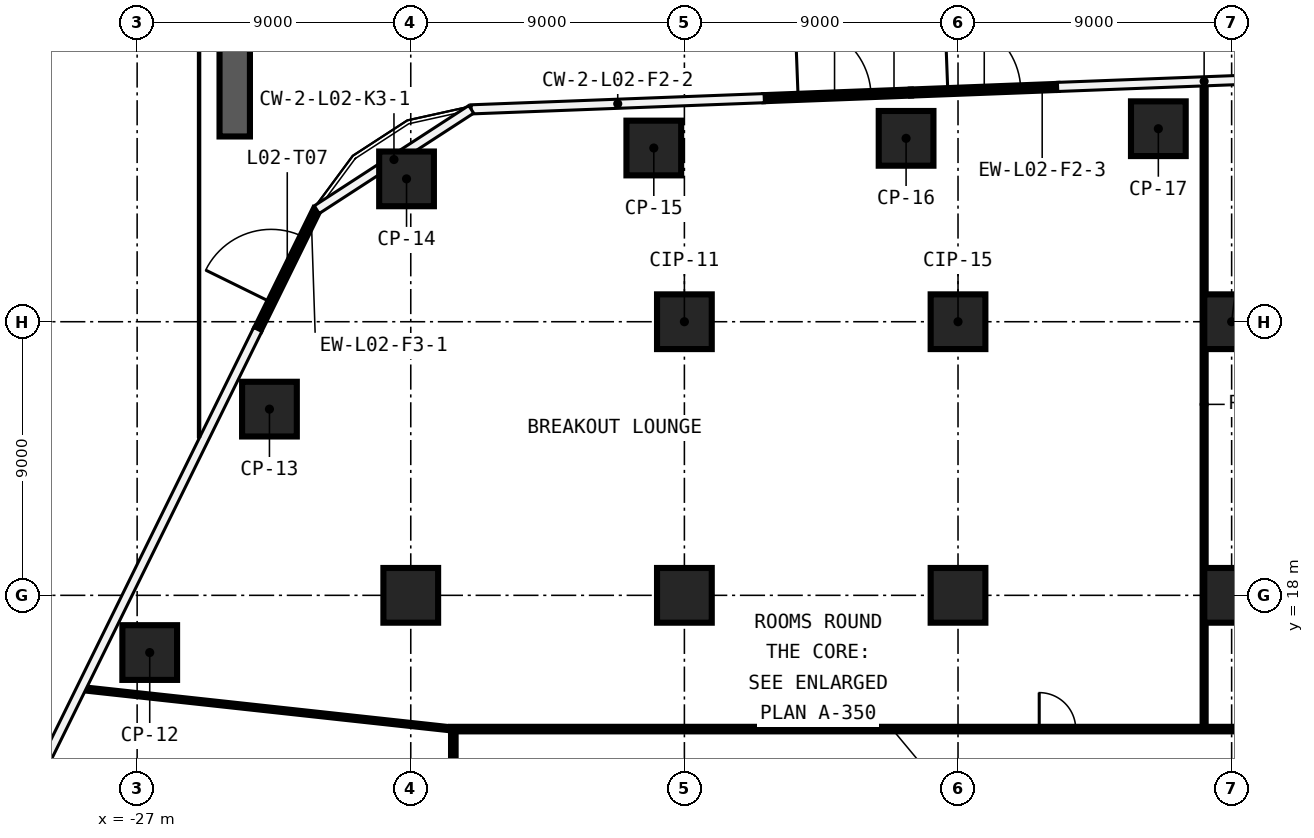
"""IFC4 building model, lengths in metres.
Left out: names, types, materials, properties, quantities, classifications, styles, units other than length and angle.
Written with IfcOpenShell. Run it as: python <this file> out.ifc"""

import sys

from ifc_helpers import new_model, si_unit, direction, frame, frame_2d, origin, origin_2d, place, context, subcontext, project, spatial, rectangle, extrude, element, fill, save


model = new_model("IFC4")
c1 = context("Model", 3, precision=1e-05, world=origin(), true_north=direction((0.0, 1.0)))
c2 = subcontext(c1, "Body", "Model", "MODEL_VIEW")
j1 = project(units=[si_unit("LENGTHUNIT", "METRE"), si_unit("PLANEANGLEUNIT", "RADIAN")], contexts=[c1])
p1 = place(None, origin())
s1 = spatial("IfcSite", under=j1, at=p1, CompositionType="ELEMENT")
p2 = place(p1, origin())
s2 = spatial("IfcBuilding", under=s1, at=p2, CompositionType="ELEMENT")
p3 = place(p2, frame((0.0, 0.0, 19.0)))
s3 = spatial("IfcBuildingStorey", under=s2, at=p3, CompositionType="ELEMENT", Elevation=19.0)
for number, where, z_axis, x_axis in (
    (1, (-26.586, 16.118, 0.0), (0.0, 0.0, 1.0), (1.0, 0.0, 0.0)),
    (2, (-22.648, 24.125, 0.0), (0.0, 0.0, 1.0), (1.0, 0.0, 0.0)),
    (3, (-18.139, 31.699, 0.0), (0.0, 0.0, 1.0), (1.0, 0.0, 0.0)),
    (4, (-10.006, 32.714, 0.0), (0.0, 0.0, 1.0), (1.0, 0.0, 0.0)),
    (5, (-1.708, 33.032, 0.0), (0.0, 0.0, 1.0), (1.0, 0.0, 0.0)),
    (6, (6.589, 33.349, 0.0), (0.0, 0.0, 1.0), (1.0, 0.0, 0.0)),
    (7, (-18.0, 18.0, 0.0), (0.0, 0.0, 1.0), (1.0, 0.0, 0.0)),
    (8, (-9.0, 18.0, 0.0), (0.0, 0.0, 1.0), (1.0, 0.0, 0.0)),
    (9, (-9.0, 27.0, 0.0), (0.0, 0.0, 1.0), (1.0, 0.0, 0.0)),
    (10, (0.0, 18.0, 0.0), (0.0, 0.0, 1.0), (1.0, 0.0, 0.0)),
    (11, (0.0, 27.0, 0.0), (0.0, 0.0, 1.0), (1.0, 0.0, 0.0)),
    (12, (9.0, 18.0, 0.0), (0.0, 0.0, 1.0), (1.0, 0.0, 0.0)),
    (13, (9.0, 27.0, 0.0), (0.0, 0.0, 1.0), (1.0, 0.0, 0.0)),
):
    element("IfcColumn", number, at=place(p3, frame(where, z_axis=z_axis, x_axis=x_axis)), inside=s3, PredefinedType="COLUMN", context=c2, shape_type="SweptSolid", body=[
        extrude(rectangle(XDim=1.8, YDim=1.8, at=origin_2d()), origin(), (0.0, 0.0, 1.0), 7.55),
    ])
p4 = place(p3, frame((-16.675, 13.6, 0.0), z_axis=(0.0, 0.0, 1.0), x_axis=(1.0, 0.0, 0.0)))
e14 = element("IfcWall", 14, at=p4, inside=s3, PredefinedType="PARTITIONING", context=c2, shape_type="SweptSolid", body=[
    extrude(rectangle(XDim=33.35, YDim=0.15, at=frame_2d((16.675, 0.0))), origin(), (0.0, 0.0, 1.0), 7.55),
])
p5 = place(p4, frame((27.447, 0.0, 0.0)))
e15 = element("IfcOpeningElement", 15, at=p5, cuts=e14, PredefinedType="OPENING", context=c2, shape_type="SweptSolid", body=[
    extrude(rectangle(XDim=1.2, YDim=2.1, at=frame_2d((0.6, 1.05))), frame((0.0, 0.085, 0.0), z_axis=(0.0, -1.0, 0.0), x_axis=(1.0, 0.0, 0.0)), (0.0, 0.0, 1.0), 0.17),
])
p6 = place(p4, frame((19.346, 0.0, 0.0)))
e16 = element("IfcOpeningElement", 16, at=p6, cuts=e14, PredefinedType="OPENING", context=c2, shape_type="SweptSolid", body=[
    extrude(rectangle(XDim=1.2, YDim=2.1, at=frame_2d((0.6, 1.05))), frame((0.0, 0.085, 0.0), z_axis=(0.0, -1.0, 0.0), x_axis=(1.0, 0.0, 0.0)), (0.0, 0.0, 1.0), 0.17),
])
p7 = place(p3, frame((8.095, 13.675, 0.0), z_axis=(0.0, 0.0, 1.0), x_axis=(0.0, 1.0, 0.0)))
e17 = element("IfcWall", 17, at=p7, inside=s3, PredefinedType="PARTITIONING", context=c2, shape_type="SweptSolid", body=[
    extrude(rectangle(XDim=21.213, YDim=0.1, at=frame_2d((10.606, 0.0))), origin(), (0.0, 0.0, 1.0), 7.55),
])
p8 = place(p3, frame((-16.6, -13.525, 0.0), z_axis=(0.0, 0.0, 1.0), x_axis=(0.0, 1.0, 0.0)))
e18 = element("IfcWall", 18, at=p8, inside=s3, PredefinedType="PARTITIONING", context=c2, shape_type="SweptSolid", body=[
    extrude(rectangle(XDim=27.05, YDim=0.15, at=frame_2d((13.525, 0.0))), origin(), (0.0, 0.0, 1.0), 7.55),
])
p9 = place(p8, frame((16.028, 0.0, 0.0)))
e19 = element("IfcOpeningElement", 19, at=p9, cuts=e18, PredefinedType="OPENING", context=c2, shape_type="SweptSolid", body=[
    extrude(rectangle(XDim=1.2, YDim=2.1, at=frame_2d((0.6, 1.05))), frame((0.0, 0.085, 0.0), z_axis=(0.0, -1.0, 0.0), x_axis=(1.0, 0.0, 0.0)), (0.0, 0.0, 1.0), 0.17),
])
p10 = place(p8, frame((1.121, 0.0, 0.0)))
e20 = element("IfcOpeningElement", 20, at=p10, cuts=e18, PredefinedType="OPENING", context=c2, shape_type="SweptSolid", body=[
    extrude(rectangle(XDim=1.2, YDim=2.1, at=frame_2d((0.6, 1.05))), frame((0.0, 0.085, 0.0), z_axis=(0.0, -1.0, 0.0), x_axis=(1.0, 0.0, 0.0)), (0.0, 0.0, 1.0), 0.17),
])
p11 = place(p8, frame((24.705, 0.0, 0.0)))
e21 = element("IfcOpeningElement", 21, at=p11, cuts=e18, PredefinedType="OPENING", context=c2, shape_type="SweptSolid", body=[
    extrude(rectangle(XDim=1.2, YDim=2.1, at=frame_2d((0.6, 1.05))), frame((0.0, 0.085, 0.0), z_axis=(0.0, -1.0, 0.0), x_axis=(1.0, 0.0, 0.0)), (0.0, 0.0, 1.0), 0.17),
])
p12 = place(p3, frame((-28.819, 14.931, 0.0), z_axis=(0.0, 0.0, 1.0), x_axis=(0.994112645196, -0.108351505116, 0.0)))
e22 = element("IfcWall", 22, at=p12, inside=s3, PredefinedType="PARTITIONING", context=c2, shape_type="SweptSolid", body=[
    extrude(rectangle(XDim=12.291, YDim=0.1, at=frame_2d((6.146, 0.0))), origin(), (0.0, 0.0, 1.0), 7.55),
])
p13 = place(p3, frame((-1.549, 34.539, 0.0), z_axis=(0.0, 0.0, 1.0), x_axis=(0.99926884885, 0.038233070992, 0.0)))
e23 = element("IfcWall", 23, at=p13, inside=s3, PredefinedType="SOLIDWALL", context=c2, shape_type="SweptSolid", body=[
    extrude(rectangle(XDim=4.827, YDim=0.2, at=frame_2d((2.414, 0.0))), origin(), (0.0, 0.0, 1.0), 7.55),
])
p14 = place(p13, frame((1.214, 0.0, 0.0)))
e24 = element("IfcOpeningElement", 24, at=p14, cuts=e23, PredefinedType="OPENING", context=c2, shape_type="SweptSolid", body=[
    extrude(rectangle(XDim=2.4, YDim=2.4, at=frame_2d((1.2, 1.2))), frame((0.0, 0.11, 0.0), z_axis=(0.0, -1.0, 0.0), x_axis=(1.0, 0.0, 0.0)), (0.0, 0.0, 1.0), 0.22),
])
p15 = place(p3, frame((-6.373, 34.354, 0.0), z_axis=(0.0, 0.0, 1.0), x_axis=(0.999268774919, 0.038235003231, 0.0)))
e25 = element("IfcWall", 25, at=p15, inside=s3, PredefinedType="SOLIDWALL", context=c2, shape_type="SweptSolid", body=[
    extrude(rectangle(XDim=4.827, YDim=0.2, at=frame_2d((2.414, 0.0))), origin(), (0.0, 0.0, 1.0), 7.55),
])
p16 = place(p15, frame((1.114, 0.0, 0.0)))
e26 = element("IfcOpeningElement", 26, at=p16, cuts=e25, PredefinedType="OPENING", context=c2, shape_type="SweptSolid", body=[
    extrude(rectangle(XDim=2.4, YDim=2.4, at=frame_2d((1.2, 1.2))), frame((0.0, 0.11, 0.0), z_axis=(0.0, -1.0, 0.0), x_axis=(1.0, 0.0, 0.0)), (0.0, 0.0, 1.0), 0.22),
])
p17 = place(p3, frame((-23.031, 26.746, 0.0), z_axis=(0.0, 0.0, 1.0), x_axis=(0.44130937851, 0.89735502029, 0.0)))
e27 = element("IfcWall", 27, at=p17, inside=s3, PredefinedType="SOLIDWALL", context=c2, shape_type="SweptSolid", body=[
    extrude(rectangle(XDim=4.39, YDim=0.2, at=frame_2d((2.195, 0.0))), origin(), (0.0, 0.0, 1.0), 7.55),
])
p18 = place(p17, frame((0.995, 0.0, 0.0)))
e28 = element("IfcOpeningElement", 28, at=p18, cuts=e27, PredefinedType="OPENING", context=c2, shape_type="SweptSolid", body=[
    extrude(rectangle(XDim=2.4, YDim=2.4, at=frame_2d((1.2, 1.2))), frame((0.0, 0.11, 0.0), z_axis=(0.0, -1.0, 0.0), x_axis=(1.0, 0.0, 0.0)), (0.0, 0.0, 1.0), 0.22),
])
p19 = place(p3, frame((-23.79, 33.094, 0.0), z_axis=(0.0, 0.0, 1.0), x_axis=(0.0, 1.0, 0.0)))
e29 = element("IfcWall", 29, at=p19, inside=s3, PredefinedType="SOLIDWALL", context=c2, shape_type="SweptSolid", body=[
    extrude(rectangle(XDim=14.697, YDim=1.0, at=frame_2d((7.348, 0.0))), origin(), (0.0, 0.0, 1.0), 0.9),
])
p20 = place(p6, origin())
e30 = element("IfcDoor", 30, at=p20, inside=s3, OperationType="SINGLE_SWING_RIGHT", PredefinedType="DOOR", context=c2, shape_type="SweptSolid", body=[
    extrude(rectangle(XDim=1.2, YDim=2.1, at=frame_2d((0.6, 1.05))), frame((0.0, 0.025, 0.0), z_axis=(0.0, -1.0, 0.0), x_axis=(1.0, 0.0, 0.0)), (0.0, 0.0, 1.0), 0.05),
])
fill(e16, e30)
p21 = place(p14, origin())
e31 = element("IfcDoor", 31, at=p21, inside=s3, OperationType="SINGLE_SWING_LEFT", PredefinedType="DOOR", context=c2, shape_type="SweptSolid", body=[
    extrude(rectangle(XDim=2.4, YDim=2.4, at=frame_2d((1.2, 1.2))), frame((0.0, 0.025, 0.0), z_axis=(0.0, -1.0, 0.0), x_axis=(1.0, 0.0, 0.0)), (0.0, 0.0, 1.0), 0.05),
])
fill(e24, e31)
p22 = place(p16, origin())
e32 = element("IfcDoor", 32, at=p22, inside=s3, OperationType="SINGLE_SWING_LEFT", PredefinedType="DOOR", context=c2, shape_type="SweptSolid", body=[
    extrude(rectangle(XDim=2.4, YDim=2.4, at=frame_2d((1.2, 1.2))), frame((0.0, 0.025, 0.0), z_axis=(0.0, -1.0, 0.0), x_axis=(1.0, 0.0, 0.0)), (0.0, 0.0, 1.0), 0.05),
])
fill(e26, e32)
p23 = place(p18, origin())
e33 = element("IfcDoor", 33, at=p23, inside=s3, OperationType="SINGLE_SWING_LEFT", PredefinedType="DOOR", context=c2, shape_type="SweptSolid", body=[
    extrude(rectangle(XDim=2.4, YDim=2.4, at=frame_2d((1.2, 1.2))), frame((0.0, 0.025, 0.0), z_axis=(0.0, -1.0, 0.0), x_axis=(1.0, 0.0, 0.0)), (0.0, 0.0, 1.0), 0.05),
])
fill(e28, e33)
save(model, sys.argv[1])
